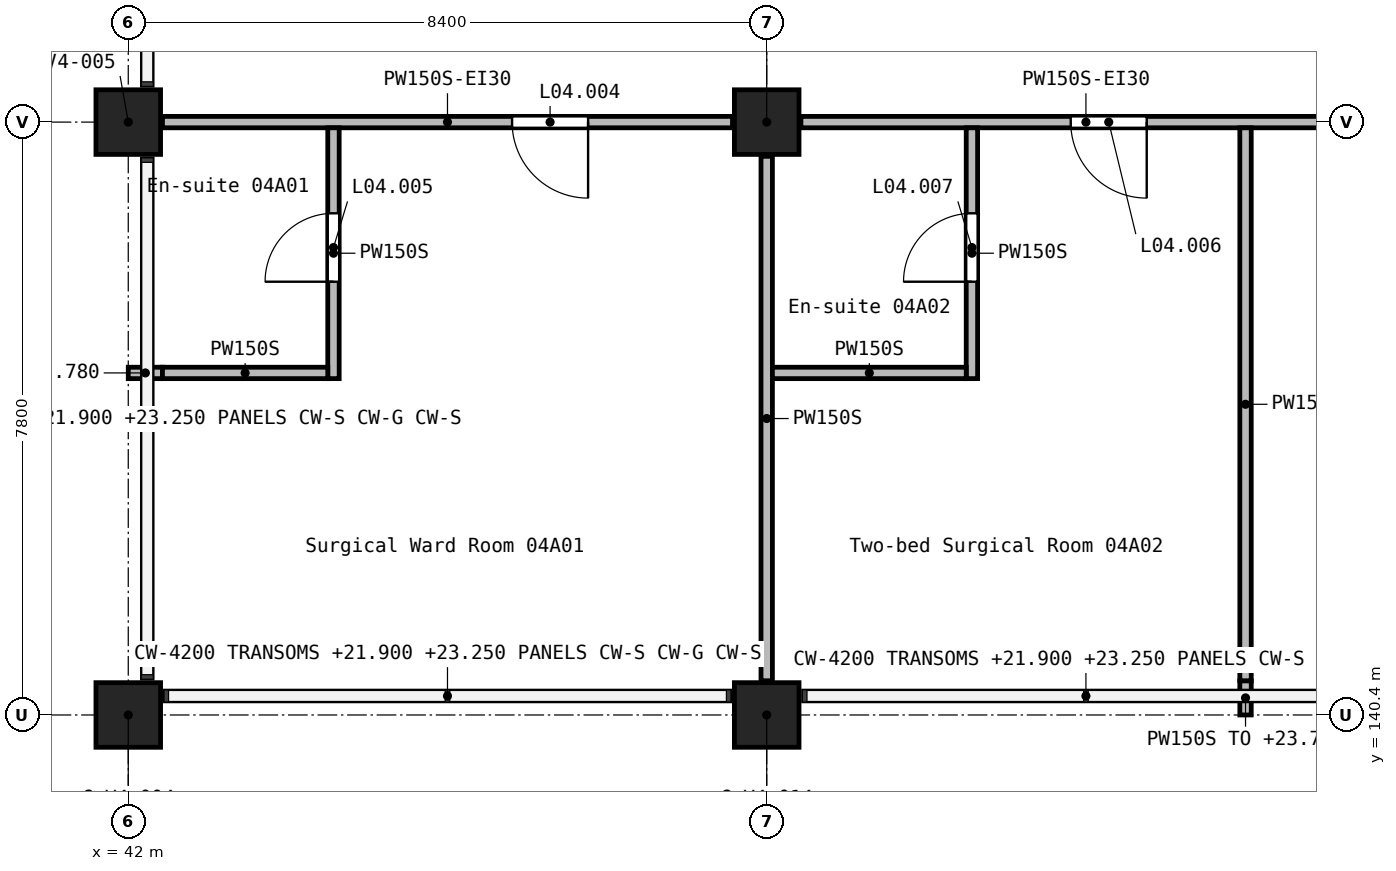
"""IFC4 building model, lengths in metres.
Left out: names, types, materials, properties, quantities, classifications, styles, units other than length and angle.
Written with IfcOpenShell. Run it as: python <this file> out.ifc"""

import sys

from ifc_helpers import new_model, si_unit, direction, frame, frame_2d, origin, origin_2d, place, context, subcontext, project, spatial, rectangle, extrude, element, fill, save


model = new_model("IFC4")
c1 = context("Model", 3, precision=1e-05, world=origin(), true_north=direction((0.0, 1.0)))
c2 = subcontext(c1, "Body", "Model", "MODEL_VIEW")
j1 = project(units=[si_unit("LENGTHUNIT", "METRE"), si_unit("PLANEANGLEUNIT", "RADIAN")], contexts=[c1])
p1 = place(None, origin())
s1 = spatial("IfcSite", under=j1, at=p1, CompositionType="ELEMENT")
p2 = place(p1, origin())
s2 = spatial("IfcBuilding", under=s1, at=p2, CompositionType="ELEMENT")
p3 = place(p2, frame((0.0, 0.0, 21.0)))
s3 = spatial("IfcBuildingStorey", under=s2, at=p3, CompositionType="ELEMENT", Elevation=21.0)
for number, where, z_axis, x_axis in (
    (1, (42.0, 140.4, 0.0), (0.0, 0.0, 1.0), (1.0, 0.0, 0.0)),
    (2, (42.0, 148.2, 0.0), (0.0, 0.0, 1.0), (1.0, 0.0, 0.0)),
    (3, (50.4, 140.4, 0.0), (0.0, 0.0, 1.0), (1.0, 0.0, 0.0)),
    (4, (50.4, 148.2, 0.0), (0.0, 0.0, 1.0), (1.0, 0.0, 0.0)),
):
    element("IfcColumn", number, at=place(p3, frame(where, z_axis=z_axis, x_axis=x_axis)), inside=s3, PredefinedType="COLUMN", context=c2, shape_type="SweptSolid", body=[
        extrude(rectangle(XDim=0.85, YDim=0.85, at=origin_2d()), origin(), (0.0, 0.0, 1.0), 3.9),
    ])
p4 = place(p3, frame((58.35, 148.2, 0.0), z_axis=(0.0, 0.0, 1.0), x_axis=(-1.0, 0.0, 0.0)))
e5 = element("IfcWall", 5, at=p4, inside=s3, PredefinedType="PARTITIONING", context=c2, shape_type="SweptSolid", body=[
    extrude(rectangle(XDim=7.5, YDim=0.15, at=frame_2d((3.75, 0.0))), origin(), (0.0, 0.0, 1.0), 3.6),
])
p5 = place(p4, frame((2.95, 0.0, 0.0)))
e6 = element("IfcOpeningElement", 6, at=p5, cuts=e5, PredefinedType="OPENING", context=c2, shape_type="SweptSolid", body=[
    extrude(rectangle(XDim=1.0, YDim=2.1, at=frame_2d((0.5, 1.05))), frame((0.0, 0.085, 0.0), z_axis=(0.0, -1.0, 0.0), x_axis=(1.0, 0.0, 0.0)), (0.0, 0.0, 1.0), 0.17),
])
p6 = place(p3, frame((49.95, 148.2, 0.0), z_axis=(0.0, 0.0, 1.0), x_axis=(-1.0, 0.0, 0.0)))
e7 = element("IfcWall", 7, at=p6, inside=s3, PredefinedType="PARTITIONING", context=c2, shape_type="SweptSolid", body=[
    extrude(rectangle(XDim=7.5, YDim=0.15, at=frame_2d((3.75, 0.0))), origin(), (0.0, 0.0, 1.0), 3.6),
])
p7 = place(p6, frame((1.9, 0.0, 0.0)))
e8 = element("IfcOpeningElement", 8, at=p7, cuts=e7, PredefinedType="OPENING", context=c2, shape_type="SweptSolid", body=[
    extrude(rectangle(XDim=1.0, YDim=2.1, at=frame_2d((0.5, 1.05))), frame((0.0, 0.085, 0.0), z_axis=(0.0, -1.0, 0.0), x_axis=(1.0, 0.0, 0.0)), (0.0, 0.0, 1.0), 0.17),
])
p8 = place(p3, frame((50.4, 140.85, 0.0), z_axis=(0.0, 0.0, 1.0), x_axis=(0.0, 1.0, 0.0)))
e9 = element("IfcWall", 9, at=p8, inside=s3, PredefinedType="PARTITIONING", context=c2, shape_type="SweptSolid", body=[
    extrude(rectangle(XDim=6.9, YDim=0.15, at=frame_2d((3.45, 0.0))), origin(), (0.0, 0.0, 1.0), 3.6),
])
p9 = place(p3, frame((56.7, 140.4, 0.0), z_axis=(0.0, 0.0, 1.0), x_axis=(0.0, 1.0, 0.0)))
e10 = element("IfcWall", 10, at=p9, inside=s3, PredefinedType="PARTITIONING", context=c2, shape_type="SweptSolid", body=[
    extrude(rectangle(XDim=0.45, YDim=0.15, at=frame_2d((0.225, 0.0))), origin(), (0.0, 0.0, 1.0), 2.78),
])
p10 = place(p3, frame((56.7, 140.85, 0.0), z_axis=(0.0, 0.0, 1.0), x_axis=(0.0, 1.0, 0.0)))
e11 = element("IfcWall", 11, at=p10, inside=s3, PredefinedType="PARTITIONING", context=c2, shape_type="SweptSolid", body=[
    extrude(rectangle(XDim=7.275, YDim=0.15, at=frame_2d((3.637, 0.0))), origin(), (0.0, 0.0, 1.0), 3.6),
])
p11 = place(p3, frame((44.7, 144.825, 0.0), z_axis=(0.0, 0.0, 1.0), x_axis=(0.0, 1.0, 0.0)))
e12 = element("IfcWall", 12, at=p11, inside=s3, PredefinedType="PARTITIONING", context=c2, shape_type="SweptSolid", body=[
    extrude(rectangle(XDim=3.3, YDim=0.15, at=frame_2d((1.65, 0.0))), origin(), (0.0, 0.0, 1.0), 3.6),
])
p12 = place(p11, frame((1.275, 0.0, 0.0)))
e13 = element("IfcOpeningElement", 13, at=p12, cuts=e12, PredefinedType="OPENING", context=c2, shape_type="SweptSolid", body=[
    extrude(rectangle(XDim=0.9, YDim=2.1, at=frame_2d((0.45, 1.05))), frame((0.0, 0.085, 0.0), z_axis=(0.0, -1.0, 0.0), x_axis=(1.0, 0.0, 0.0)), (0.0, 0.0, 1.0), 0.17),
])
p13 = place(p3, frame((53.1, 144.825, 0.0), z_axis=(0.0, 0.0, 1.0), x_axis=(0.0, 1.0, 0.0)))
e14 = element("IfcWall", 14, at=p13, inside=s3, PredefinedType="PARTITIONING", context=c2, shape_type="SweptSolid", body=[
    extrude(rectangle(XDim=3.3, YDim=0.15, at=frame_2d((1.65, 0.0))), origin(), (0.0, 0.0, 1.0), 3.6),
])
p14 = place(p13, frame((1.275, 0.0, 0.0)))
e15 = element("IfcOpeningElement", 15, at=p14, cuts=e14, PredefinedType="OPENING", context=c2, shape_type="SweptSolid", body=[
    extrude(rectangle(XDim=0.9, YDim=2.1, at=frame_2d((0.45, 1.05))), frame((0.0, 0.085, 0.0), z_axis=(0.0, -1.0, 0.0), x_axis=(1.0, 0.0, 0.0)), (0.0, 0.0, 1.0), 0.17),
])
p15 = place(p3, frame((42.0, 144.9, 0.0), z_axis=(0.0, 0.0, 1.0), x_axis=(1.0, 0.0, 0.0)))
e16 = element("IfcWall", 16, at=p15, inside=s3, PredefinedType="PARTITIONING", context=c2, shape_type="SweptSolid", body=[
    extrude(rectangle(XDim=0.45, YDim=0.15, at=frame_2d((0.225, 0.0))), origin(), (0.0, 0.0, 1.0), 2.78),
])
p16 = place(p3, frame((42.45, 144.9, 0.0), z_axis=(0.0, 0.0, 1.0), x_axis=(1.0, 0.0, 0.0)))
e17 = element("IfcWall", 17, at=p16, inside=s3, PredefinedType="PARTITIONING", context=c2, shape_type="SweptSolid", body=[
    extrude(rectangle(XDim=2.175, YDim=0.15, at=frame_2d((1.087, 0.0))), origin(), (0.0, 0.0, 1.0), 3.6),
])
p17 = place(p3, frame((50.475, 144.9, 0.0), z_axis=(0.0, 0.0, 1.0), x_axis=(1.0, 0.0, 0.0)))
e18 = element("IfcWall", 18, at=p17, inside=s3, PredefinedType="PARTITIONING", context=c2, shape_type="SweptSolid", body=[
    extrude(rectangle(XDim=2.55, YDim=0.15, at=frame_2d((1.275, 0.0))), origin(), (0.0, 0.0, 1.0), 3.6),
])
p18 = place(p7, origin())
e19 = element("IfcDoor", 19, at=p18, inside=s3, OperationType="SINGLE_SWING_LEFT", PredefinedType="DOOR", context=c2, shape_type="SweptSolid", body=[
    extrude(rectangle(XDim=1.0, YDim=2.1, at=frame_2d((0.5, 1.05))), frame((0.0, 0.025, 0.0), z_axis=(0.0, -1.0, 0.0), x_axis=(1.0, 0.0, 0.0)), (0.0, 0.0, 1.0), 0.05),
])
fill(e8, e19)
p19 = place(p12, origin())
e20 = element("IfcDoor", 20, at=p19, inside=s3, OperationType="SINGLE_SWING_RIGHT", PredefinedType="DOOR", context=c2, shape_type="SweptSolid", body=[
    extrude(rectangle(XDim=0.9, YDim=2.1, at=frame_2d((0.45, 1.05))), frame((0.0, 0.025, 0.0), z_axis=(0.0, -1.0, 0.0), x_axis=(1.0, 0.0, 0.0)), (0.0, 0.0, 1.0), 0.05),
])
fill(e13, e20)
p20 = place(p5, origin())
e21 = element("IfcDoor", 21, at=p20, inside=s3, OperationType="SINGLE_SWING_LEFT", PredefinedType="DOOR", context=c2, shape_type="SweptSolid", body=[
    extrude(rectangle(XDim=1.0, YDim=2.1, at=frame_2d((0.5, 1.05))), frame((0.0, 0.025, 0.0), z_axis=(0.0, -1.0, 0.0), x_axis=(1.0, 0.0, 0.0)), (0.0, 0.0, 1.0), 0.05),
])
fill(e6, e21)
p21 = place(p14, origin())
e22 = element("IfcDoor", 22, at=p21, inside=s3, OperationType="SINGLE_SWING_RIGHT", PredefinedType="DOOR", context=c2, shape_type="SweptSolid", body=[
    extrude(rectangle(XDim=0.9, YDim=2.1, at=frame_2d((0.45, 1.05))), frame((0.0, 0.025, 0.0), z_axis=(0.0, -1.0, 0.0), x_axis=(1.0, 0.0, 0.0)), (0.0, 0.0, 1.0), 0.05),
])
fill(e15, e22)
save(model, sys.argv[1])
